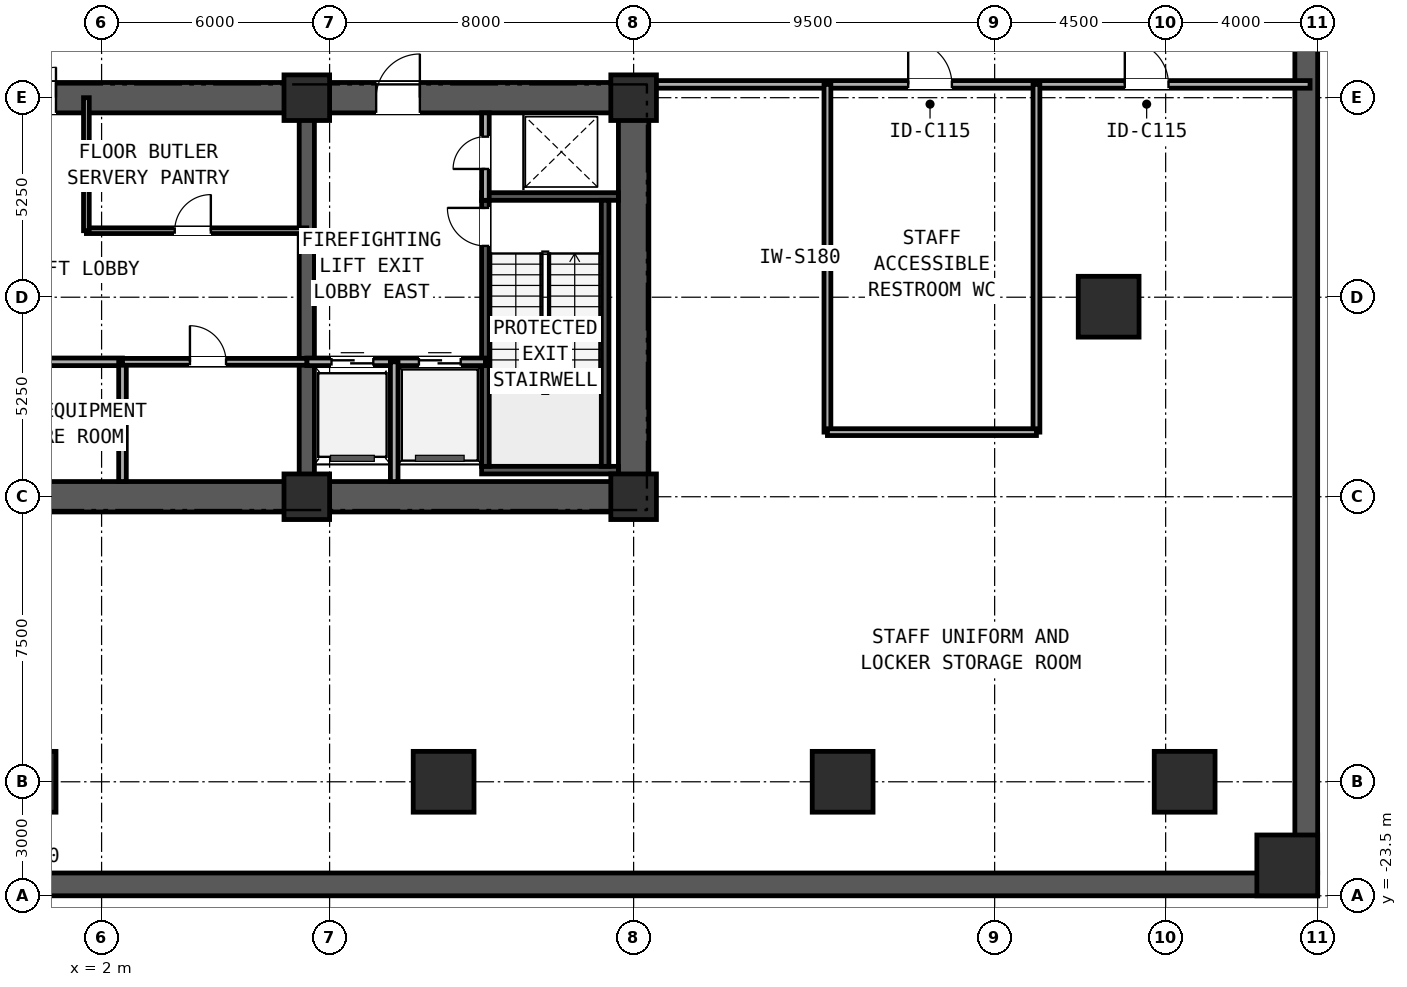
"""IFC4 building model, lengths in metres.
Left out: names, types, materials, properties, quantities, classifications, styles, units other than length and angle.
Written with IfcOpenShell. Run it as: python <this file> out.ifc"""

import sys

from ifc_helpers import new_model, si_unit, direction, frame, frame_2d, origin, origin_2d, place, context, subcontext, project, spatial, rectangle, extrude, element, fill, save


model = new_model("IFC4")
c1 = context("Model", 3, precision=1e-05, world=origin(), true_north=direction((0.0, 1.0)))
c2 = subcontext(c1, "Body", "Model", "MODEL_VIEW")
j1 = project(units=[si_unit("LENGTHUNIT", "METRE"), si_unit("PLANEANGLEUNIT", "RADIAN")], contexts=[c1])
p1 = place(None, origin())
s1 = spatial("IfcSite", under=j1, at=p1, CompositionType="ELEMENT")
p2 = place(p1, origin())
s2 = spatial("IfcBuilding", under=s1, at=p2, CompositionType="ELEMENT")
p3 = place(p2, frame((0.0, 0.0, -5.2)))
s3 = spatial("IfcBuildingStorey", under=s2, at=p3, CompositionType="ELEMENT", Elevation=-5.2)
p4 = place(p3, frame((-16.4, -13.0, 0.0), z_axis=(0.0, 0.0, 1.0), x_axis=(1.0, 0.0, 0.0)))
e1 = element("IfcWall", 1, at=p4, inside=s3, PredefinedType="SHEAR", context=c2, shape_type="SweptSolid", body=[
    extrude(rectangle(XDim=32.8, YDim=0.8, at=frame_2d((16.4, 0.0))), origin(), (0.0, 0.0, 1.0), 4.62),
])
p5 = place(p3, frame((-16.4, -2.5, 0.0), z_axis=(0.0, 0.0, 1.0), x_axis=(1.0, 0.0, 0.0)))
e2 = element("IfcWall", 2, at=p5, inside=s3, PredefinedType="SHEAR", context=c2, shape_type="SweptSolid", body=[
    extrude(rectangle(XDim=32.8, YDim=0.8, at=frame_2d((16.4, 0.0))), origin(), (0.0, 0.0, 1.0), 4.62),
])
p6 = place(p5, frame((6.025, 0.0, 0.0)))
e3 = element("IfcOpeningElement", 3, at=p6, cuts=e2, PredefinedType="OPENING", context=c2, shape_type="SweptSolid", body=[
    extrude(rectangle(XDim=1.15, YDim=2.0, at=frame_2d((0.575, 1.0))), frame((0.0, 0.41, 0.0), z_axis=(0.0, -1.0, 0.0), x_axis=(1.0, 0.0, 0.0)), (0.0, 0.0, 1.0), 0.82),
])
p7 = place(p5, frame((15.6, 0.0, 0.0)))
e4 = element("IfcOpeningElement", 4, at=p7, cuts=e2, PredefinedType="OPENING", context=c2, shape_type="SweptSolid", body=[
    extrude(rectangle(XDim=1.6, YDim=2.0, at=frame_2d((0.8, 1.0))), frame((0.0, 0.41, 0.0), z_axis=(0.0, -1.0, 0.0), x_axis=(1.0, 0.0, 0.0)), (0.0, 0.0, 1.0), 0.82),
])
p8 = place(p5, frame((25.625, 0.0, 0.0)))
e5 = element("IfcOpeningElement", 5, at=p8, cuts=e2, PredefinedType="OPENING", context=c2, shape_type="SweptSolid", body=[
    extrude(rectangle(XDim=1.15, YDim=2.0, at=frame_2d((0.575, 1.0))), frame((0.0, 0.41, 0.0), z_axis=(0.0, -1.0, 0.0), x_axis=(1.0, 0.0, 0.0)), (0.0, 0.0, 1.0), 0.82),
])
p9 = place(p3, frame((16.0, -12.6, 0.0), z_axis=(0.0, 0.0, 1.0), x_axis=(0.0, 1.0, 0.0)))
e6 = element("IfcWall", 6, at=p9, inside=s3, PredefinedType="SHEAR", context=c2, shape_type="SweptSolid", body=[
    extrude(rectangle(XDim=9.7, YDim=0.8, at=frame_2d((4.85, 0.0))), origin(), (0.0, 0.0, 1.0), 4.62),
])
p10 = place(p3, frame((7.4, -12.6, 0.0), z_axis=(0.0, 0.0, 1.0), x_axis=(0.0, 1.0, 0.0)))
e7 = element("IfcWall", 7, at=p10, inside=s3, PredefinedType="SHEAR", context=c2, shape_type="SweptSolid", body=[
    extrude(rectangle(XDim=9.7, YDim=0.4, at=frame_2d((4.85, 0.0))), origin(), (0.0, 0.0, 1.0), 4.9),
])
for number, where, z_axis, x_axis in (
    (8, (12.0, -12.3, 0.0), (0.0, 0.0, 1.0), (1.0, 0.0, 0.0)),
    (9, (12.0, -5.1, 0.0), (0.0, 0.0, 1.0), (1.0, 0.0, 0.0)),
):
    element("IfcWall", number, at=place(p3, frame(where, z_axis=z_axis, x_axis=x_axis)), inside=s3, PredefinedType="SOLIDWALL", context=c2, shape_type="SweptSolid", body=[
        extrude(rectangle(XDim=3.6, YDim=0.2, at=frame_2d((1.8, 0.0))), origin(), (0.0, 0.0, 1.0), 4.9),
    ])
p11 = place(p3, frame((12.1, -12.2, 0.0), z_axis=(0.0, 0.0, 1.0), x_axis=(0.0, 1.0, 0.0)))
e10 = element("IfcWall", 10, at=p11, inside=s3, PredefinedType="SOLIDWALL", context=c2, shape_type="SweptSolid", body=[
    extrude(rectangle(XDim=7.0, YDim=0.2, at=frame_2d((3.5, 0.0))), origin(), (0.0, 0.0, 1.0), 4.9),
])
p12 = place(p11, frame((5.8, 0.0, 0.0)))
e11 = element("IfcOpeningElement", 11, at=p12, cuts=e10, PredefinedType="OPENING", context=c2, shape_type="SweptSolid", body=[
    extrude(rectangle(XDim=1.0, YDim=2.1, at=frame_2d((0.5, 1.05))), frame((0.0, 0.11, 0.0), z_axis=(0.0, -1.0, 0.0), x_axis=(1.0, 0.0, 0.0)), (0.0, 0.0, 1.0), 0.22),
])
p13 = place(p3, frame((15.25, -12.2, 0.0), z_axis=(0.0, 0.0, 1.0), x_axis=(0.0, 1.0, 0.0)))
e12 = element("IfcWall", 12, at=p13, inside=s3, PredefinedType="SOLIDWALL", context=c2, shape_type="SweptSolid", body=[
    extrude(rectangle(XDim=7.0, YDim=0.2, at=frame_2d((3.5, 0.0))), origin(), (0.0, 0.0, 1.0), 4.9),
])
p14 = place(p3, frame((-34.0, -23.2, 0.0), z_axis=(0.0, 0.0, 1.0), x_axis=(1.0, 0.0, 0.0)))
e13 = element("IfcWall", 13, at=p14, inside=s3, PredefinedType="SOLIDWALL", context=c2, shape_type="SweptSolid", body=[
    extrude(rectangle(XDim=68.0, YDim=0.6, at=frame_2d((34.0, 0.0))), origin(), (0.0, 0.0, 1.0), 4.9),
])
p15 = place(p3, frame((33.7, -22.9, 0.0), z_axis=(0.0, 0.0, 1.0), x_axis=(0.0, 1.0, 0.0)))
e14 = element("IfcWall", 14, at=p15, inside=s3, PredefinedType="SOLIDWALL", context=c2, shape_type="SweptSolid", body=[
    extrude(rectangle(XDim=45.8, YDim=0.6, at=frame_2d((22.9, 0.0))), origin(), (0.0, 0.0, 1.0), 4.9),
])
for number, where, z_axis, x_axis in (
    (15, (7.4, -13.0, 0.0), (0.0, 0.0, 1.0), (1.0, 0.0, 0.0)),
    (16, (16.0, -13.0, 0.0), (0.0, 0.0, 1.0), (1.0, 0.0, 0.0)),
    (17, (7.4, -2.5, 0.0), (0.0, 0.0, 1.0), (1.0, 0.0, 0.0)),
    (18, (16.0, -2.5, 0.0), (0.0, 0.0, 1.0), (1.0, 0.0, 0.0)),
):
    element("IfcColumn", number, at=place(p3, frame(where, z_axis=z_axis, x_axis=x_axis)), inside=s3, PredefinedType="COLUMN", context=c2, shape_type="SweptSolid", body=[
        extrude(rectangle(XDim=1.2, YDim=1.2, at=origin_2d()), origin(), (0.0, 0.0, 1.0), 5.2),
    ])
for number, where, z_axis, x_axis in (
    (19, (33.2, -22.7, 0.0), (0.0, 0.0, 1.0), (1.0, 0.0, 0.0)),
    (20, (0.0, -20.5, 0.0), (0.0, 0.0, 1.0), (1.0, 0.0, 0.0)),
    (21, (11.0, -20.5, 0.0), (0.0, 0.0, 1.0), (1.0, 0.0, 0.0)),
    (22, (21.5, -20.5, 0.0), (0.0, 0.0, 1.0), (1.0, 0.0, 0.0)),
    (23, (30.5, -20.5, 0.0), (0.0, 0.0, 1.0), (1.0, 0.0, 0.0)),
    (24, (28.5, -8.0, 0.0), (0.0, 0.0, 1.0), (1.0, 0.0, 0.0)),
):
    element("IfcColumn", number, at=place(p3, frame(where, z_axis=z_axis, x_axis=x_axis)), inside=s3, PredefinedType="COLUMN", context=c2, shape_type="SweptSolid", body=[
        extrude(rectangle(XDim=1.6, YDim=1.6, at=origin_2d()), origin(), (0.0, 0.0, 1.0), 5.2),
    ])
p16 = place(p3, frame((12.1, -5.2, 0.0), z_axis=(0.0, 0.0, 1.0), x_axis=(0.0, 1.0, 0.0)))
e25 = element("IfcWall", 25, at=p16, inside=s3, PredefinedType="PARTITIONING", context=c2, shape_type="SweptSolid", body=[
    extrude(rectangle(XDim=2.3, YDim=0.2, at=frame_2d((1.15, 0.0))), origin(), (0.0, 0.0, 1.0), 4.9),
])
p17 = place(p16, frame((0.825, 0.0, 0.0)))
e26 = element("IfcOpeningElement", 26, at=p17, cuts=e25, PredefinedType="OPENING", context=c2, shape_type="SweptSolid", body=[
    extrude(rectangle(XDim=0.85, YDim=2.05, at=frame_2d((0.425, 1.025))), frame((0.0, 0.11, 0.0), z_axis=(0.0, -1.0, 0.0), x_axis=(1.0, 0.0, 0.0)), (0.0, 0.0, 1.0), 0.22),
])
p18 = place(p3, frame((7.4, -9.45, 0.0), z_axis=(0.0, 0.0, 1.0), x_axis=(1.0, 0.0, 0.0)))
e27 = element("IfcWall", 27, at=p18, inside=s3, PredefinedType="PARTITIONING", context=c2, shape_type="SweptSolid", body=[
    extrude(rectangle(XDim=4.7, YDim=0.2, at=frame_2d((2.35, 0.0))), origin(), (0.0, 0.0, 1.0), 4.9),
])
p19 = place(p18, frame((2.95, 0.0, 0.0)))
e28 = element("IfcOpeningElement", 28, at=p19, cuts=e27, PredefinedType="OPENING", context=c2, shape_type="SweptSolid", body=[
    extrude(rectangle(XDim=1.1, YDim=2.2, at=frame_2d((0.55, 1.1))), frame((0.0, 0.11, 0.0), z_axis=(0.0, -1.0, 0.0), x_axis=(1.0, 0.0, 0.0)), (0.0, 0.0, 1.0), 0.22),
])
p20 = place(p18, frame((0.65, 0.0, 0.0)))
e29 = element("IfcOpeningElement", 29, at=p20, cuts=e27, PredefinedType="OPENING", context=c2, shape_type="SweptSolid", body=[
    extrude(rectangle(XDim=1.1, YDim=2.2, at=frame_2d((0.55, 1.1))), frame((0.0, 0.11, 0.0), z_axis=(0.0, -1.0, 0.0), x_axis=(1.0, 0.0, 0.0)), (0.0, 0.0, 1.0), 0.22),
])
p21 = place(p3, frame((9.7, -12.6, 0.0), z_axis=(0.0, 0.0, 1.0), x_axis=(0.0, 1.0, 0.0)))
e30 = element("IfcWall", 30, at=p21, inside=s3, PredefinedType="PARTITIONING", context=c2, shape_type="SweptSolid", body=[
    extrude(rectangle(XDim=3.15, YDim=0.2, at=frame_2d((1.575, 0.0))), origin(), (0.0, 0.0, 1.0), 4.9),
])
p22 = place(p3, frame((-2.55, -9.45, 0.0), z_axis=(0.0, 0.0, 1.0), x_axis=(1.0, 0.0, 0.0)))
e31 = element("IfcWall", 31, at=p22, inside=s3, PredefinedType="PARTITIONING", context=c2, shape_type="SweptSolid", body=[
    extrude(rectangle(XDim=5.1, YDim=0.2, at=frame_2d((2.55, 0.0))), origin(), (0.0, 0.0, 1.0), 4.9),
])
p23 = place(p22, frame((2.075, 0.0, 0.0)))
e32 = element("IfcOpeningElement", 32, at=p23, cuts=e31, PredefinedType="OPENING", context=c2, shape_type="SweptSolid", body=[
    extrude(rectangle(XDim=0.95, YDim=2.15, at=frame_2d((0.475, 1.075))), frame((0.0, 0.11, 0.0), z_axis=(0.0, -1.0, 0.0), x_axis=(1.0, 0.0, 0.0)), (0.0, 0.0, 1.0), 0.22),
])
p24 = place(p3, frame((2.55, -12.6, 0.0), z_axis=(0.0, 0.0, 1.0), x_axis=(0.0, 1.0, 0.0)))
e33 = element("IfcWall", 33, at=p24, inside=s3, PredefinedType="PARTITIONING", context=c2, shape_type="SweptSolid", body=[
    extrude(rectangle(XDim=3.15, YDim=0.2, at=frame_2d((1.575, 0.0))), origin(), (0.0, 0.0, 1.0), 4.9),
])
p25 = place(p3, frame((2.55, -9.45, 0.0), z_axis=(0.0, 0.0, 1.0), x_axis=(1.0, 0.0, 0.0)))
e34 = element("IfcWall", 34, at=p25, inside=s3, PredefinedType="PARTITIONING", context=c2, shape_type="SweptSolid", body=[
    extrude(rectangle(XDim=4.85, YDim=0.18, at=frame_2d((2.425, 0.0))), origin(), (0.0, 0.0, 1.0), 4.9),
])
p26 = place(p25, frame((1.775, 0.0, 0.0)))
e35 = element("IfcOpeningElement", 35, at=p26, cuts=e34, PredefinedType="OPENING", context=c2, shape_type="SweptSolid", body=[
    extrude(rectangle(XDim=0.95, YDim=2.15, at=frame_2d((0.475, 1.075))), frame((0.0, 0.1, 0.0), z_axis=(0.0, -1.0, 0.0), x_axis=(1.0, 0.0, 0.0)), (0.0, 0.0, 1.0), 0.2),
])
p27 = place(p3, frame((1.6, -6.0, 0.0), z_axis=(0.0, 0.0, 1.0), x_axis=(1.0, 0.0, 0.0)))
e36 = element("IfcWall", 36, at=p27, inside=s3, PredefinedType="PARTITIONING", context=c2, shape_type="SweptSolid", body=[
    extrude(rectangle(XDim=5.8, YDim=0.15, at=frame_2d((2.9, 0.0))), origin(), (0.0, 0.0, 1.0), 4.9),
])
p28 = place(p27, frame((2.325, 0.0, 0.0)))
e37 = element("IfcOpeningElement", 37, at=p28, cuts=e36, PredefinedType="OPENING", context=c2, shape_type="SweptSolid", body=[
    extrude(rectangle(XDim=0.95, YDim=2.15, at=frame_2d((0.475, 1.075))), frame((0.0, 0.085, 0.0), z_axis=(0.0, -1.0, 0.0), x_axis=(1.0, 0.0, 0.0)), (0.0, 0.0, 1.0), 0.17),
])
p29 = place(p3, frame((1.6, -6.0, 0.0), z_axis=(0.0, 0.0, 1.0), x_axis=(0.0, 1.0, 0.0)))
e38 = element("IfcWall", 38, at=p29, inside=s3, PredefinedType="PARTITIONING", context=c2, shape_type="SweptSolid", body=[
    extrude(rectangle(XDim=3.5, YDim=0.15, at=frame_2d((1.75, 0.0))), origin(), (0.0, 0.0, 1.0), 4.03),
])
p30 = place(p3, frame((16.0, -2.15, 0.0), z_axis=(0.0, 0.0, 1.0), x_axis=(1.0, 0.0, 0.0)))
e39 = element("IfcWall", 39, at=p30, inside=s3, PredefinedType="PARTITIONING", context=c2, shape_type="SweptSolid", body=[
    extrude(rectangle(XDim=17.8, YDim=0.2, at=frame_2d((8.9, 0.0))), origin(), (0.0, 0.0, 1.0), 4.03),
])
p31 = place(p30, frame((7.225, 0.0, 0.0)))
e40 = element("IfcOpeningElement", 40, at=p31, cuts=e39, PredefinedType="OPENING", context=c2, shape_type="SweptSolid", body=[
    extrude(rectangle(XDim=1.15, YDim=2.2, at=frame_2d((0.575, 1.1))), frame((0.0, 0.11, 0.0), z_axis=(0.0, -1.0, 0.0), x_axis=(1.0, 0.0, 0.0)), (0.0, 0.0, 1.0), 0.22),
])
p32 = place(p30, frame((12.925, 0.0, 0.0)))
e41 = element("IfcOpeningElement", 41, at=p32, cuts=e39, PredefinedType="OPENING", context=c2, shape_type="SweptSolid", body=[
    extrude(rectangle(XDim=1.15, YDim=2.2, at=frame_2d((0.575, 1.1))), frame((0.0, 0.11, 0.0), z_axis=(0.0, -1.0, 0.0), x_axis=(1.0, 0.0, 0.0)), (0.0, 0.0, 1.0), 0.22),
])
for number, where, z_axis, x_axis in (
    (42, (21.1, -11.3, 0.0), (0.0, 0.0, 1.0), (0.0, 1.0, 0.0)),
    (43, (26.6, -11.3, 0.0), (0.0, 0.0, 1.0), (0.0, 1.0, 0.0)),
):
    element("IfcWall", number, at=place(p3, frame(where, z_axis=z_axis, x_axis=x_axis)), inside=s3, PredefinedType="PARTITIONING", context=c2, shape_type="SweptSolid", body=[
        extrude(rectangle(XDim=9.15, YDim=0.18, at=frame_2d((4.575, 0.0))), origin(), (0.0, 0.0, 1.0), 4.03),
    ])
p33 = place(p3, frame((21.1, -11.3, 0.0), z_axis=(0.0, 0.0, 1.0), x_axis=(1.0, 0.0, 0.0)))
e44 = element("IfcWall", 44, at=p33, inside=s3, PredefinedType="PARTITIONING", context=c2, shape_type="SweptSolid", body=[
    extrude(rectangle(XDim=5.5, YDim=0.18, at=frame_2d((2.75, 0.0))), origin(), (0.0, 0.0, 1.0), 4.9),
])
p34 = place(p12, origin())
e45 = element("IfcDoor", 45, at=p34, inside=s3, OperationType="SINGLE_SWING_RIGHT", PredefinedType="DOOR", context=c2, shape_type="SweptSolid", body=[
    extrude(rectangle(XDim=1.0, YDim=2.1, at=frame_2d((0.5, 1.05))), frame((0.0, 0.025, 0.0), z_axis=(0.0, -1.0, 0.0), x_axis=(1.0, 0.0, 0.0)), (0.0, 0.0, 1.0), 0.05),
])
fill(e11, e45)
p35 = place(p17, frame((0.85, 0.0, 0.0), z_axis=(0.0, 0.0, 1.0), x_axis=(-1.0, 0.0, 0.0)))
e46 = element("IfcDoor", 46, at=p35, inside=s3, OperationType="SINGLE_SWING_LEFT", PredefinedType="DOOR", context=c2, shape_type="SweptSolid", body=[
    extrude(rectangle(XDim=0.85, YDim=2.05, at=frame_2d((0.425, 1.025))), frame((0.0, 0.025, 0.0), z_axis=(0.0, -1.0, 0.0), x_axis=(1.0, 0.0, 0.0)), (0.0, 0.0, 1.0), 0.05),
])
fill(e26, e46)
p36 = place(p19, origin())
e47 = element("IfcDoor", 47, at=p36, inside=s3, OperationType="SLIDING_TO_LEFT", PredefinedType="DOOR", context=c2, shape_type="SweptSolid", body=[
    extrude(rectangle(XDim=1.1, YDim=2.2, at=frame_2d((0.55, 1.1))), frame((0.0, 0.025, 0.0), z_axis=(0.0, -1.0, 0.0), x_axis=(1.0, 0.0, 0.0)), (0.0, 0.0, 1.0), 0.05),
])
fill(e28, e47)
p37 = place(p20, origin())
e48 = element("IfcDoor", 48, at=p37, inside=s3, OperationType="SLIDING_TO_RIGHT", PredefinedType="DOOR", context=c2, shape_type="SweptSolid", body=[
    extrude(rectangle(XDim=1.1, YDim=2.2, at=frame_2d((0.55, 1.1))), frame((0.0, 0.025, 0.0), z_axis=(0.0, -1.0, 0.0), x_axis=(1.0, 0.0, 0.0)), (0.0, 0.0, 1.0), 0.05),
])
fill(e29, e48)
p38 = place(p7, origin())
e49 = element("IfcDoor", 49, at=p38, inside=s3, OperationType="DOUBLE_DOOR_SINGLE_SWING", PredefinedType="DOOR", context=c2, shape_type="SweptSolid", body=[
    extrude(rectangle(XDim=1.6, YDim=2.0, at=frame_2d((0.8, 1.0))), frame((0.0, 0.025, 0.0), z_axis=(0.0, -1.0, 0.0), x_axis=(1.0, 0.0, 0.0)), (0.0, 0.0, 1.0), 0.05),
])
fill(e4, e49)
p39 = place(p8, origin())
e50 = element("IfcDoor", 50, at=p39, inside=s3, OperationType="SINGLE_SWING_RIGHT", PredefinedType="DOOR", context=c2, shape_type="SweptSolid", body=[
    extrude(rectangle(XDim=1.15, YDim=2.0, at=frame_2d((0.575, 1.0))), frame((0.0, 0.025, 0.0), z_axis=(0.0, -1.0, 0.0), x_axis=(1.0, 0.0, 0.0)), (0.0, 0.0, 1.0), 0.05),
])
fill(e5, e50)
p40 = place(p26, origin())
e51 = element("IfcDoor", 51, at=p40, inside=s3, OperationType="SINGLE_SWING_LEFT", PredefinedType="DOOR", context=c2, shape_type="SweptSolid", body=[
    extrude(rectangle(XDim=0.95, YDim=2.15, at=frame_2d((0.475, 1.075))), frame((0.0, 0.025, 0.0), z_axis=(0.0, -1.0, 0.0), x_axis=(1.0, 0.0, 0.0)), (0.0, 0.0, 1.0), 0.05),
])
fill(e35, e51)
p41 = place(p28, frame((0.95, 0.0, 0.0), z_axis=(0.0, 0.0, 1.0), x_axis=(-1.0, 0.0, 0.0)))
e52 = element("IfcDoor", 52, at=p41, inside=s3, OperationType="SINGLE_SWING_RIGHT", PredefinedType="DOOR", context=c2, shape_type="SweptSolid", body=[
    extrude(rectangle(XDim=0.95, YDim=2.15, at=frame_2d((0.475, 1.075))), frame((0.0, 0.025, 0.0), z_axis=(0.0, -1.0, 0.0), x_axis=(1.0, 0.0, 0.0)), (0.0, 0.0, 1.0), 0.05),
])
fill(e37, e52)
p42 = place(p31, origin())
e53 = element("IfcDoor", 53, at=p42, inside=s3, OperationType="SINGLE_SWING_LEFT", PredefinedType="DOOR", context=c2, shape_type="SweptSolid", body=[
    extrude(rectangle(XDim=1.15, YDim=2.2, at=frame_2d((0.575, 1.1))), frame((0.0, 0.025, 0.0), z_axis=(0.0, -1.0, 0.0), x_axis=(1.0, 0.0, 0.0)), (0.0, 0.0, 1.0), 0.05),
])
fill(e40, e53)
p43 = place(p32, origin())
e54 = element("IfcDoor", 54, at=p43, inside=s3, OperationType="SINGLE_SWING_LEFT", PredefinedType="DOOR", context=c2, shape_type="SweptSolid", body=[
    extrude(rectangle(XDim=1.15, YDim=2.2, at=frame_2d((0.575, 1.1))), frame((0.0, 0.025, 0.0), z_axis=(0.0, -1.0, 0.0), x_axis=(1.0, 0.0, 0.0)), (0.0, 0.0, 1.0), 0.05),
])
fill(e41, e54)
save(model, sys.argv[1])
